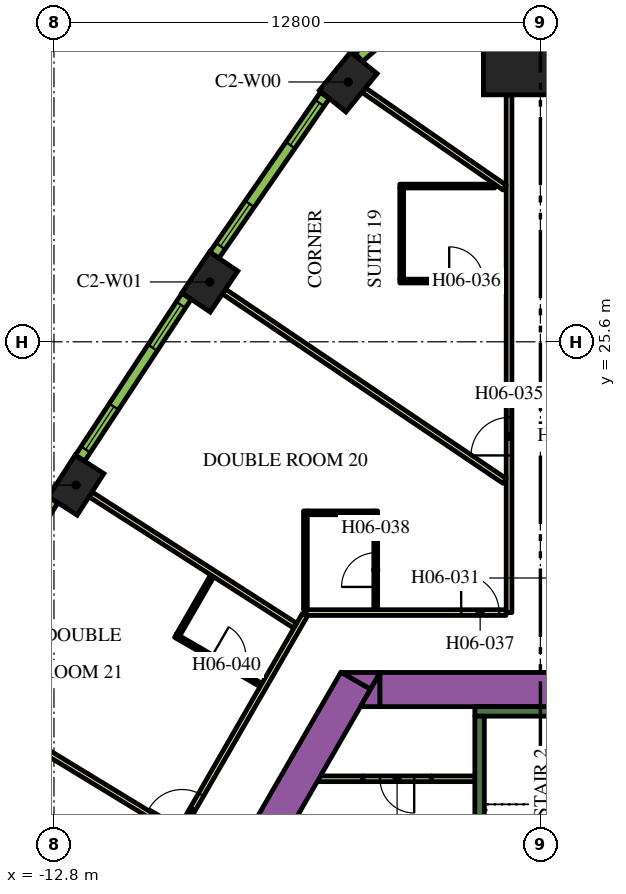
"""IFC4 building model, lengths in metres.
Left out: names, types, materials, properties, quantities, classifications, styles, units other than length and angle.
Written with IfcOpenShell. Run it as: python <this file> out.ifc"""

import sys

from ifc_helpers import new_model, si_unit, direction, frame, frame_2d, origin, origin_2d, place, context, subcontext, project, spatial, polyline, rectangle, outline, extrude, element, fill, save


model = new_model("IFC4")
c1 = context("Model", 3, precision=1e-05, world=origin(), true_north=direction((0.0, 1.0)))
c2 = subcontext(c1, "Body", "Model", "MODEL_VIEW")
j1 = project(units=[si_unit("LENGTHUNIT", "METRE"), si_unit("PLANEANGLEUNIT", "RADIAN")], contexts=[c1])
p1 = place(None, origin())
s1 = spatial("IfcSite", under=j1, at=p1, CompositionType="ELEMENT")
p2 = place(p1, origin())
s2 = spatial("IfcBuilding", under=s1, at=p2, CompositionType="ELEMENT")
p3 = place(p2, frame((0.0, 0.0, 83.7)))
s3 = spatial("IfcBuildingStorey", under=s2, at=p3, CompositionType="ELEMENT", Elevation=83.7)
p4 = place(p3, frame((0.0, 33.598, 0.0), z_axis=(0.0, 0.0, 1.0), x_axis=(0.0, 1.0, 0.0)))
e1 = element("IfcColumn", 1, at=p4, inside=s3, PredefinedType="COLUMN", context=c2, shape_type="SweptSolid", body=[
    extrude(rectangle(XDim=3.0, YDim=3.0, at=origin_2d()), origin(), (0.0, 0.0, 1.0), 3.9),
])
for number, where, z_axis, x_axis in (
    (2, (-5.056, 32.437, 0.0), (0.0, 0.0, 1.0), (-0.632, -0.775, 0.0)),
    (3, (-8.699, 27.174, 0.0), (0.0, 0.0, 1.0), (-0.559, -0.829, 0.0)),
    (4, (-12.217, 21.828, 0.0), (0.0, 0.0, 1.0), (-0.54, -0.842, 0.0)),
):
    element("IfcColumn", number, at=place(p3, frame(where, z_axis=z_axis, x_axis=x_axis)), inside=s3, PredefinedType="COLUMN", context=c2, shape_type="SweptSolid", body=[
        extrude(rectangle(XDim=1.3, YDim=0.9, at=origin_2d()), origin(), (0.0, 0.0, 1.0), 3.9),
    ])
p5 = place(p3, frame((-15.36, -1.503, 0.0), z_axis=(0.0, 0.0, 1.0), x_axis=(0.50000389221, 0.866023156604, 0.0)))
e5 = element("IfcWall", 5, at=p5, inside=s3, PredefinedType="SOLIDWALL", context=c2, shape_type="SweptSolid", body=[
    extrude(rectangle(XDim=21.0, YDim=0.9, at=frame_2d((10.5, 0.0))), origin(), (0.0, 0.0, 1.0), 3.9),
])
p6 = place(p3, origin())
e6 = element("IfcWall", 6, at=p6, inside=s3, PredefinedType="SOLIDWALL", context=c2, shape_type="SweptSolid", body=[
    extrude(outline(polyline([(-4.215, 16.9), (-4.469, 16.46), (-5.231, 16.9), (-4.215, 16.9)])), origin(), (0.0, 0.0, 1.0), 3.9),
])
p7 = place(p3, frame((-4.224, 16.45, 0.0), z_axis=(0.0, 0.0, 1.0), x_axis=(1.0, 0.0, 0.0)))
e7 = element("IfcWall", 7, at=p7, inside=s3, PredefinedType="SOLIDWALL", context=c2, shape_type="SweptSolid", body=[
    extrude(rectangle(XDim=9.488, YDim=0.9, at=frame_2d((4.744, 0.0))), origin(), (0.0, 0.0, 1.0), 3.9),
])
e8 = element("IfcWall", 8, at=p6, inside=s3, PredefinedType="SOLIDWALL", context=c2, shape_type="SweptSolid", body=[
    extrude(outline(polyline([(-4.734, 16.0), (-4.226, 16.88), (-4.226, 16.0), (-4.734, 16.0)])), origin(), (0.0, 0.0, 1.0), 3.9),
])
p8 = place(p3, frame((-1.725, 15.875, 0.0), z_axis=(0.0, 0.0, 1.0), x_axis=(1.0, 0.0, 0.0)))
e9 = element("IfcWall", 9, at=p8, inside=s3, PredefinedType="SOLIDWALL", context=c2, shape_type="SweptSolid", body=[
    extrude(rectangle(XDim=3.45, YDim=0.25, at=frame_2d((1.725, 0.0))), origin(), (0.0, 0.0, 1.0), 3.9),
])
p9 = place(p3, frame((-1.6, 8.7, 0.0), z_axis=(0.0, 0.0, 1.0), x_axis=(0.0, 1.0, 0.0)))
e10 = element("IfcWall", 10, at=p9, inside=s3, PredefinedType="SOLIDWALL", context=c2, shape_type="SweptSolid", body=[
    extrude(rectangle(XDim=7.05, YDim=0.25, at=frame_2d((3.525, 0.0))), origin(), (0.0, 0.0, 1.0), 3.9),
])
p10 = place(p3, frame((-5.851, 14.102, 0.0), z_axis=(0.0, 0.0, 1.0), x_axis=(1.0, 0.0, 0.0)))
e11 = element("IfcWall", 11, at=p10, inside=s3, PredefinedType="PARTITIONING", context=c2, shape_type="SweptSolid", body=[
    extrude(rectangle(XDim=1.18, YDim=0.15, at=frame_2d((0.59, 0.0))), origin(), (0.0, 0.0, 1.0), 2.75),
])
p11 = place(p3, frame((-2.871, 14.102, 0.0), z_axis=(0.0, 0.0, 1.0), x_axis=(1.0, 0.0, 0.0)))
e12 = element("IfcWall", 12, at=p11, inside=s3, PredefinedType="PARTITIONING", context=c2, shape_type="SweptSolid", body=[
    extrude(rectangle(XDim=1.196, YDim=0.15, at=frame_2d((0.598, 0.0))), origin(), (0.0, 0.0, 1.0), 2.75),
])
p12 = place(p3, frame((-2.871, 14.102, 0.0), z_axis=(0.0, 0.0, 1.0), x_axis=(-1.0, 0.0, 0.0)))
e13 = element("IfcWall", 13, at=p12, inside=s3, PredefinedType="PARTITIONING", context=c2, shape_type="SweptSolid", body=[
    extrude(rectangle(XDim=1.8, YDim=0.15, at=frame_2d((0.9, 0.0))), origin(), (0.0, 0.0, 1.0), 2.75),
])
p13 = place(p12, frame((0.45, 0.0, 0.0)))
e14 = element("IfcOpeningElement", 14, at=p13, cuts=e13, PredefinedType="OPENING", context=c2, shape_type="SweptSolid", body=[
    extrude(rectangle(XDim=0.9, YDim=2.1, at=frame_2d((0.45, 1.05))), frame((0.0, 0.085, 0.0), z_axis=(0.0, -1.0, 0.0), x_axis=(1.0, 0.0, 0.0)), (0.0, 0.0, 1.0), 0.17),
])
p14 = place(p3, frame((-0.825, 18.475, 0.0), z_axis=(0.0, 0.0, 1.0), x_axis=(0.0, 1.0, 0.0)))
e15 = element("IfcWall", 15, at=p14, inside=s3, PredefinedType="PARTITIONING", context=c2, shape_type="SweptSolid", body=[
    extrude(rectangle(XDim=13.623, YDim=0.15, at=frame_2d((6.812, 0.0))), origin(), (0.0, 0.0, 1.0), 2.75),
])
p15 = place(p14, frame((4.135, 0.0, 0.0)))
e16 = element("IfcOpeningElement", 16, at=p15, cuts=e15, PredefinedType="OPENING", context=c2, shape_type="SweptSolid", body=[
    extrude(rectangle(XDim=1.0, YDim=2.1, at=frame_2d((0.5, 1.05))), frame((0.0, 0.085, 0.0), z_axis=(0.0, -1.0, 0.0), x_axis=(1.0, 0.0, 0.0)), (0.0, 0.0, 1.0), 0.17),
])
p16 = place(p3, frame((-6.163, 18.475, 0.0), z_axis=(0.0, 0.0, 1.0), x_axis=(1.0, 0.0, 0.0)))
e17 = element("IfcWall", 17, at=p16, inside=s3, PredefinedType="PARTITIONING", context=c2, shape_type="SweptSolid", body=[
    extrude(rectangle(XDim=5.258, YDim=0.15, at=frame_2d((2.629, 0.0))), origin(), (0.0, 0.0, 1.0), 2.75),
])
p17 = place(p16, frame((4.078, 0.0, 0.0)))
e18 = element("IfcOpeningElement", 18, at=p17, cuts=e17, PredefinedType="OPENING", context=c2, shape_type="SweptSolid", body=[
    extrude(rectangle(XDim=1.0, YDim=2.1, at=frame_2d((0.5, 1.05))), frame((0.0, 0.085, 0.0), z_axis=(0.0, -1.0, 0.0), x_axis=(1.0, 0.0, 0.0)), (0.0, 0.0, 1.0), 0.17),
])
p18 = place(p3, frame((-19.081, -3.9, 0.0), z_axis=(0.0, 0.0, 1.0), x_axis=(0.499998313975, 0.866026377209, 0.0)))
e19 = element("IfcWall", 19, at=p18, inside=s3, PredefinedType="PARTITIONING", context=c2, shape_type="SweptSolid", body=[
    extrude(rectangle(XDim=25.766, YDim=0.15, at=frame_2d((12.883, 0.0))), origin(), (0.0, 0.0, 1.0), 2.75),
])
p19 = place(p18, frame((19.306, 0.0, 0.0)))
e20 = element("IfcOpeningElement", 20, at=p19, cuts=e19, PredefinedType="OPENING", context=c2, shape_type="SweptSolid", body=[
    extrude(rectangle(XDim=1.0, YDim=2.1, at=frame_2d((0.5, 1.05))), frame((0.0, 0.085, 0.0), z_axis=(0.0, -1.0, 0.0), x_axis=(1.0, 0.0, 0.0)), (0.0, 0.0, 1.0), 0.17),
])
p20 = place(p18, frame((18.0, 0.0, 0.0)))
e21 = element("IfcOpeningElement", 21, at=p20, cuts=e19, PredefinedType="OPENING", context=c2, shape_type="SweptSolid", body=[
    extrude(rectangle(XDim=1.0, YDim=2.1, at=frame_2d((0.5, 1.05))), frame((0.0, 0.085, 0.0), z_axis=(0.0, -1.0, 0.0), x_axis=(1.0, 0.0, 0.0)), (0.0, 0.0, 1.0), 0.17),
])
p21 = place(p18, frame((10.874, 0.0, 0.0)))
e22 = element("IfcOpeningElement", 22, at=p21, cuts=e19, PredefinedType="OPENING", context=c2, shape_type="SweptSolid", body=[
    extrude(rectangle(XDim=0.9, YDim=2.1, at=frame_2d((0.45, 1.05))), frame((0.0, 0.085, 0.0), z_axis=(0.0, -1.0, 0.0), x_axis=(1.0, 0.0, 0.0)), (0.0, 0.0, 1.0), 0.17),
])
p22 = place(p18, frame((8.548, 0.0, 0.0)))
e23 = element("IfcOpeningElement", 23, at=p22, cuts=e19, PredefinedType="OPENING", context=c2, shape_type="SweptSolid", body=[
    extrude(rectangle(XDim=1.1, YDim=2.1, at=frame_2d((0.55, 1.05))), frame((0.0, 0.085, 0.0), z_axis=(0.0, -1.0, 0.0), x_axis=(1.0, 0.0, 0.0)), (0.0, 0.0, 1.0), 0.17),
])
p23 = place(p18, frame((0.18, 0.0, 0.0)))
e24 = element("IfcOpeningElement", 24, at=p23, cuts=e19, PredefinedType="OPENING", context=c2, shape_type="SweptSolid", body=[
    extrude(rectangle(XDim=1.0, YDim=2.1, at=frame_2d((0.5, 1.05))), frame((0.0, 0.085, 0.0), z_axis=(0.0, -1.0, 0.0), x_axis=(1.0, 0.0, 0.0)), (0.0, 0.0, 1.0), 0.17),
])
p24 = place(p3, frame((-15.225, 16.167, 0.0), z_axis=(0.0, 0.0, 1.0), x_axis=(0.854088713274, -0.520127359266, 0.0)))
e25 = element("IfcWall", 25, at=p24, inside=s3, PredefinedType="PARTITIONING", context=c2, shape_type="SweptSolid", body=[
    extrude(rectangle(XDim=6.611, YDim=0.15, at=frame_2d((3.305, 0.0))), origin(), (0.0, 0.0, 1.0), 2.75),
])
p25 = place(p3, frame((-11.838, 21.585, 0.0), z_axis=(0.0, 0.0, 1.0), x_axis=(0.841699322813, -0.539946525108, 0.0)))
e26 = element("IfcWall", 26, at=p25, inside=s3, PredefinedType="PARTITIONING", context=c2, shape_type="SweptSolid", body=[
    extrude(rectangle(XDim=6.392, YDim=0.15, at=frame_2d((3.196, 0.0))), origin(), (0.0, 0.0, 1.0), 2.75),
])
p26 = place(p3, frame((-8.326, 26.923, 0.0), z_axis=(0.0, 0.0, 1.0), x_axis=(0.828836601893, -0.5594907393, 0.0)))
e27 = element("IfcWall", 27, at=p26, inside=s3, PredefinedType="PARTITIONING", context=c2, shape_type="SweptSolid", body=[
    extrude(rectangle(XDim=8.909, YDim=0.15, at=frame_2d((4.455, 0.0))), origin(), (0.0, 0.0, 1.0), 2.75),
])
p27 = place(p3, frame((-4.649, 32.223, 0.0), z_axis=(0.0, 0.0, 1.0), x_axis=(0.822262349475, -0.569108626394, 0.0)))
e28 = element("IfcWall", 28, at=p27, inside=s3, PredefinedType="PARTITIONING", context=c2, shape_type="SweptSolid", body=[
    extrude(rectangle(XDim=4.51, YDim=0.15, at=frame_2d((2.255, 0.0))), origin(), (0.0, 0.0, 1.0), 2.75),
])
p28 = place(p3, frame((-3.7, 27.198, 0.0), z_axis=(0.0, 0.0, 1.0), x_axis=(1.0, 0.0, 0.0)))
e29 = element("IfcWall", 29, at=p28, inside=s3, PredefinedType="PARTITIONING", context=c2, shape_type="SweptSolid", body=[
    extrude(rectangle(XDim=2.8, YDim=0.1, at=frame_2d((1.4, 0.0))), origin(), (0.0, 0.0, 1.0), 2.75),
])
p29 = place(p28, frame((1.3, 0.0, 0.0)))
e30 = element("IfcOpeningElement", 30, at=p29, cuts=e29, PredefinedType="OPENING", context=c2, shape_type="SweptSolid", body=[
    extrude(rectangle(XDim=0.9, YDim=2.1, at=frame_2d((0.45, 1.05))), frame((0.0, 0.06, 0.0), z_axis=(0.0, -1.0, 0.0), x_axis=(1.0, 0.0, 0.0)), (0.0, 0.0, 1.0), 0.12),
])
p30 = place(p3, frame((-3.65, 27.248, 0.0), z_axis=(0.0, 0.0, 1.0), x_axis=(0.0, 1.0, 0.0)))
e31 = element("IfcWall", 31, at=p30, inside=s3, PredefinedType="PARTITIONING", context=c2, shape_type="SweptSolid", body=[
    extrude(rectangle(XDim=2.4, YDim=0.1, at=frame_2d((1.2, 0.0))), origin(), (0.0, 0.0, 1.0), 2.75),
])
p31 = place(p3, frame((-1.2, 29.698, 0.0), z_axis=(0.0, 0.0, 1.0), x_axis=(-1.0, 0.0, 0.0)))
e32 = element("IfcWall", 32, at=p31, inside=s3, PredefinedType="PARTITIONING", context=c2, shape_type="SweptSolid", body=[
    extrude(rectangle(XDim=2.5, YDim=0.1, at=frame_2d((1.25, 0.0))), origin(), (0.0, 0.0, 1.0), 2.75),
])
p32 = place(p3, frame((-4.333, 18.55, 0.0), z_axis=(0.0, 0.0, 1.0), x_axis=(0.0, 1.0, 0.0)))
e33 = element("IfcWall", 33, at=p32, inside=s3, PredefinedType="PARTITIONING", context=c2, shape_type="SweptSolid", body=[
    extrude(rectangle(XDim=2.6, YDim=0.1, at=frame_2d((1.3, 0.0))), origin(), (0.0, 0.0, 1.0), 2.75),
])
p33 = place(p32, frame((0.6, 0.0, 0.0)))
e34 = element("IfcOpeningElement", 34, at=p33, cuts=e33, PredefinedType="OPENING", context=c2, shape_type="SweptSolid", body=[
    extrude(rectangle(XDim=0.9, YDim=2.1, at=frame_2d((0.45, 1.05))), frame((0.0, 0.06, 0.0), z_axis=(0.0, -1.0, 0.0), x_axis=(1.0, 0.0, 0.0)), (0.0, 0.0, 1.0), 0.12),
])
p34 = place(p3, frame((-4.383, 21.1, 0.0), z_axis=(0.0, 0.0, 1.0), x_axis=(-1.0, 0.0, 0.0)))
e35 = element("IfcWall", 35, at=p34, inside=s3, PredefinedType="PARTITIONING", context=c2, shape_type="SweptSolid", body=[
    extrude(rectangle(XDim=1.75, YDim=0.1, at=frame_2d((0.875, 0.0))), origin(), (0.0, 0.0, 1.0), 2.75),
])
p35 = place(p3, frame((-6.183, 18.55, 0.0), z_axis=(0.0, 0.0, 1.0), x_axis=(0.0, 1.0, 0.0)))
e36 = element("IfcWall", 36, at=p35, inside=s3, PredefinedType="PARTITIONING", context=c2, shape_type="SweptSolid", body=[
    extrude(rectangle(XDim=2.6, YDim=0.1, at=frame_2d((1.3, 0.0))), origin(), (0.0, 0.0, 1.0), 2.75),
])
p36 = place(p3, frame((-9.603, 17.868, 0.0), z_axis=(0.0, 0.0, 1.0), x_axis=(0.866021400173, -0.500006934395, 0.0)))
e37 = element("IfcWall", 37, at=p36, inside=s3, PredefinedType="PARTITIONING", context=c2, shape_type="SweptSolid", body=[
    extrude(rectangle(XDim=2.6, YDim=0.1, at=frame_2d((1.3, 0.0))), origin(), (0.0, 0.0, 1.0), 2.75),
])
p37 = place(p36, frame((1.1, 0.0, 0.0)))
e38 = element("IfcOpeningElement", 38, at=p37, cuts=e37, PredefinedType="OPENING", context=c2, shape_type="SweptSolid", body=[
    extrude(rectangle(XDim=0.9, YDim=2.1, at=frame_2d((0.45, 1.05))), frame((0.0, 0.06, 0.0), z_axis=(0.0, -1.0, 0.0), x_axis=(1.0, 0.0, 0.0)), (0.0, 0.0, 1.0), 0.12),
])
p38 = place(p3, frame((-9.534, 17.886, 0.0), z_axis=(0.0, 0.0, 1.0), x_axis=(0.500041240653, 0.866001592173, 0.0)))
e39 = element("IfcWall", 39, at=p38, inside=s3, PredefinedType="PARTITIONING", context=c2, shape_type="SweptSolid", body=[
    extrude(rectangle(XDim=1.79, YDim=0.1, at=frame_2d((0.895, 0.0))), origin(), (0.0, 0.0, 1.0), 2.75),
])
p39 = place(p3, frame((-3.405, 34.275, 0.0), z_axis=(0.0, 0.0, 1.0), x_axis=(-0.754882764627, -0.655859749999, 0.0)))
e40 = element("IfcWall", 40, at=p39, inside=s3, PredefinedType="SOLIDWALL", context=c2, shape_type="SweptSolid", body=[
    extrude(rectangle(XDim=1.82, YDim=0.29, at=frame_2d((0.91, 0.0))), origin(), (0.0, 0.0, 1.0), 3.65),
])
p40 = place(p39, frame((0.46, 0.0, 0.9)))
e41 = element("IfcOpeningElement", 41, at=p40, cuts=e40, PredefinedType="OPENING", context=c2, shape_type="SweptSolid", body=[
    extrude(rectangle(XDim=0.9, YDim=2.15, at=frame_2d((0.45, 1.075))), frame((0.0, 0.155, 0.0), z_axis=(0.0, -1.0, 0.0), x_axis=(1.0, 0.0, 0.0)), (0.0, 0.0, 1.0), 0.31),
])
p41 = place(p3, frame((-5.673, 32.081, 0.0), z_axis=(0.0, 0.0, 1.0), x_axis=(-0.569113019126, -0.822259309136, 0.0)))
e42 = element("IfcWall", 42, at=p41, inside=s3, PredefinedType="SOLIDWALL", context=c2, shape_type="SweptSolid", body=[
    extrude(rectangle(XDim=5.107, YDim=0.29, at=frame_2d((2.553, 0.0))), origin(), (0.0, 0.0, 1.0), 3.65),
])
p42 = place(p41, frame((0.24, 0.0, 0.9)))
e43 = element("IfcOpeningElement", 43, at=p42, cuts=e42, PredefinedType="OPENING", context=c2, shape_type="SweptSolid", body=[
    extrude(rectangle(XDim=1.35, YDim=2.15, at=frame_2d((0.675, 1.075))), frame((0.0, 0.155, 0.0), z_axis=(0.0, -1.0, 0.0), x_axis=(1.0, 0.0, 0.0)), (0.0, 0.0, 1.0), 0.31),
])
p43 = place(p41, frame((3.471, 0.0, 0.9)))
e44 = element("IfcOpeningElement", 44, at=p43, cuts=e42, PredefinedType="OPENING", context=c2, shape_type="SweptSolid", body=[
    extrude(rectangle(XDim=1.35, YDim=2.15, at=frame_2d((0.675, 1.075))), frame((0.0, 0.155, 0.0), z_axis=(0.0, -1.0, 0.0), x_axis=(1.0, 0.0, 0.0)), (0.0, 0.0, 1.0), 0.31),
])
p44 = place(p3, frame((-9.311, 26.799, 0.0), z_axis=(0.0, 0.0, 1.0), x_axis=(-0.549741341923, -0.835334937005, 0.0)))
e45 = element("IfcWall", 45, at=p44, inside=s3, PredefinedType="SOLIDWALL", context=c2, shape_type="SweptSolid", body=[
    extrude(rectangle(XDim=5.1, YDim=0.29, at=frame_2d((2.55, 0.0))), origin(), (0.0, 0.0, 1.0), 3.65),
])
p45 = place(p44, frame((0.273, 0.0, 0.9)))
e46 = element("IfcOpeningElement", 46, at=p45, cuts=e45, PredefinedType="OPENING", context=c2, shape_type="SweptSolid", body=[
    extrude(rectangle(XDim=1.35, YDim=2.15, at=frame_2d((0.675, 1.075))), frame((0.0, 0.155, 0.0), z_axis=(0.0, -1.0, 0.0), x_axis=(1.0, 0.0, 0.0)), (0.0, 0.0, 1.0), 0.31),
])
p46 = place(p44, frame((3.478, 0.0, 0.9)))
e47 = element("IfcOpeningElement", 47, at=p46, cuts=e45, PredefinedType="OPENING", context=c2, shape_type="SweptSolid", body=[
    extrude(rectangle(XDim=1.35, YDim=2.15, at=frame_2d((0.675, 1.075))), frame((0.0, 0.155, 0.0), z_axis=(0.0, -1.0, 0.0), x_axis=(1.0, 0.0, 0.0)), (0.0, 0.0, 1.0), 0.31),
])
p47 = place(p3, frame((-12.82, 21.439, 0.0), z_axis=(0.0, 0.0, 1.0), x_axis=(-0.530072082134, -0.847952585787, 0.0)))
e48 = element("IfcWall", 48, at=p47, inside=s3, PredefinedType="SOLIDWALL", context=c2, shape_type="SweptSolid", body=[
    extrude(rectangle(XDim=5.1, YDim=0.29, at=frame_2d((2.55, 0.0))), origin(), (0.0, 0.0, 1.0), 3.65),
])
p48 = place(p47, frame((0.273, 0.0, 0.9)))
e49 = element("IfcOpeningElement", 49, at=p48, cuts=e48, PredefinedType="OPENING", context=c2, shape_type="SweptSolid", body=[
    extrude(rectangle(XDim=1.35, YDim=2.15, at=frame_2d((0.675, 1.075))), frame((0.0, 0.155, 0.0), z_axis=(0.0, -1.0, 0.0), x_axis=(1.0, 0.0, 0.0)), (0.0, 0.0, 1.0), 0.31),
])
p49 = place(p47, frame((3.478, 0.0, 0.9)))
e50 = element("IfcOpeningElement", 50, at=p49, cuts=e48, PredefinedType="OPENING", context=c2, shape_type="SweptSolid", body=[
    extrude(rectangle(XDim=1.35, YDim=2.15, at=frame_2d((0.675, 1.075))), frame((0.0, 0.155, 0.0), z_axis=(0.0, -1.0, 0.0), x_axis=(1.0, 0.0, 0.0)), (0.0, 0.0, 1.0), 0.31),
])
p50 = place(p13, origin())
e51 = element("IfcDoor", 51, at=p50, inside=s3, OperationType="SINGLE_SWING_LEFT", PredefinedType="DOOR", context=c2, shape_type="SweptSolid", body=[
    extrude(rectangle(XDim=0.9, YDim=2.1, at=frame_2d((0.45, 1.05))), frame((0.0, 0.025, 0.0), z_axis=(0.0, -1.0, 0.0), x_axis=(1.0, 0.0, 0.0)), (0.0, 0.0, 1.0), 0.05),
])
fill(e14, e51)
p51 = place(p15, origin())
e52 = element("IfcDoor", 52, at=p51, inside=s3, OperationType="SINGLE_SWING_LEFT", PredefinedType="DOOR", context=c2, shape_type="SweptSolid", body=[
    extrude(rectangle(XDim=1.0, YDim=2.1, at=frame_2d((0.5, 1.05))), frame((0.0, 0.025, 0.0), z_axis=(0.0, -1.0, 0.0), x_axis=(1.0, 0.0, 0.0)), (0.0, 0.0, 1.0), 0.05),
])
fill(e16, e52)
p52 = place(p29, origin())
e53 = element("IfcDoor", 53, at=p52, inside=s3, OperationType="SINGLE_SWING_LEFT", PredefinedType="DOOR", context=c2, shape_type="SweptSolid", body=[
    extrude(rectangle(XDim=0.9, YDim=2.1, at=frame_2d((0.45, 1.05))), frame((0.0, 0.025, 0.0), z_axis=(0.0, -1.0, 0.0), x_axis=(1.0, 0.0, 0.0)), (0.0, 0.0, 1.0), 0.05),
])
fill(e30, e53)
p53 = place(p17, origin())
e54 = element("IfcDoor", 54, at=p53, inside=s3, OperationType="SINGLE_SWING_RIGHT", PredefinedType="DOOR", context=c2, shape_type="SweptSolid", body=[
    extrude(rectangle(XDim=1.0, YDim=2.1, at=frame_2d((0.5, 1.05))), frame((0.0, 0.025, 0.0), z_axis=(0.0, -1.0, 0.0), x_axis=(1.0, 0.0, 0.0)), (0.0, 0.0, 1.0), 0.05),
])
fill(e18, e54)
p54 = place(p33, origin())
e55 = element("IfcDoor", 55, at=p54, inside=s3, OperationType="SINGLE_SWING_LEFT", PredefinedType="DOOR", context=c2, shape_type="SweptSolid", body=[
    extrude(rectangle(XDim=0.9, YDim=2.1, at=frame_2d((0.45, 1.05))), frame((0.0, 0.025, 0.0), z_axis=(0.0, -1.0, 0.0), x_axis=(1.0, 0.0, 0.0)), (0.0, 0.0, 1.0), 0.05),
])
fill(e34, e55)
p55 = place(p19, origin())
e56 = element("IfcDoor", 56, at=p55, inside=s3, OperationType="SINGLE_SWING_LEFT", PredefinedType="DOOR", context=c2, shape_type="SweptSolid", body=[
    extrude(rectangle(XDim=1.0, YDim=2.1, at=frame_2d((0.5, 1.05))), frame((0.0, 0.025, 0.0), z_axis=(0.0, -1.0, 0.0), x_axis=(1.0, 0.0, 0.0)), (0.0, 0.0, 1.0), 0.05),
])
fill(e20, e56)
p56 = place(p37, origin())
e57 = element("IfcDoor", 57, at=p56, inside=s3, OperationType="SINGLE_SWING_RIGHT", PredefinedType="DOOR", context=c2, shape_type="SweptSolid", body=[
    extrude(rectangle(XDim=0.9, YDim=2.1, at=frame_2d((0.45, 1.05))), frame((0.0, 0.025, 0.0), z_axis=(0.0, -1.0, 0.0), x_axis=(1.0, 0.0, 0.0)), (0.0, 0.0, 1.0), 0.05),
])
fill(e38, e57)
p57 = place(p42, origin())
e58 = element("IfcWindow", 58, at=p57, inside=s3, PartitioningType="DOUBLE_PANEL_VERTICAL", PredefinedType="WINDOW", context=c2, shape_type="SweptSolid", body=[
    extrude(rectangle(XDim=1.35, YDim=2.15, at=frame_2d((0.675, 1.075))), frame((0.0, 0.015, 0.0), z_axis=(0.0, -1.0, 0.0), x_axis=(1.0, 0.0, 0.0)), (0.0, 0.0, 1.0), 0.06),
])
fill(e43, e58)
p58 = place(p43, origin())
e59 = element("IfcWindow", 59, at=p58, inside=s3, PartitioningType="DOUBLE_PANEL_VERTICAL", PredefinedType="WINDOW", context=c2, shape_type="SweptSolid", body=[
    extrude(rectangle(XDim=1.35, YDim=2.15, at=frame_2d((0.675, 1.075))), frame((0.0, 0.015, 0.0), z_axis=(0.0, -1.0, 0.0), x_axis=(1.0, 0.0, 0.0)), (0.0, 0.0, 1.0), 0.06),
])
fill(e44, e59)
p59 = place(p45, origin())
e60 = element("IfcWindow", 60, at=p59, inside=s3, PartitioningType="DOUBLE_PANEL_VERTICAL", PredefinedType="WINDOW", context=c2, shape_type="SweptSolid", body=[
    extrude(rectangle(XDim=1.35, YDim=2.15, at=frame_2d((0.675, 1.075))), frame((0.0, 0.015, 0.0), z_axis=(0.0, -1.0, 0.0), x_axis=(1.0, 0.0, 0.0)), (0.0, 0.0, 1.0), 0.06),
])
fill(e46, e60)
p60 = place(p46, origin())
e61 = element("IfcWindow", 61, at=p60, inside=s3, PartitioningType="DOUBLE_PANEL_VERTICAL", PredefinedType="WINDOW", context=c2, shape_type="SweptSolid", body=[
    extrude(rectangle(XDim=1.35, YDim=2.15, at=frame_2d((0.675, 1.075))), frame((0.0, 0.015, 0.0), z_axis=(0.0, -1.0, 0.0), x_axis=(1.0, 0.0, 0.0)), (0.0, 0.0, 1.0), 0.06),
])
fill(e47, e61)
save(model, sys.argv[1])
